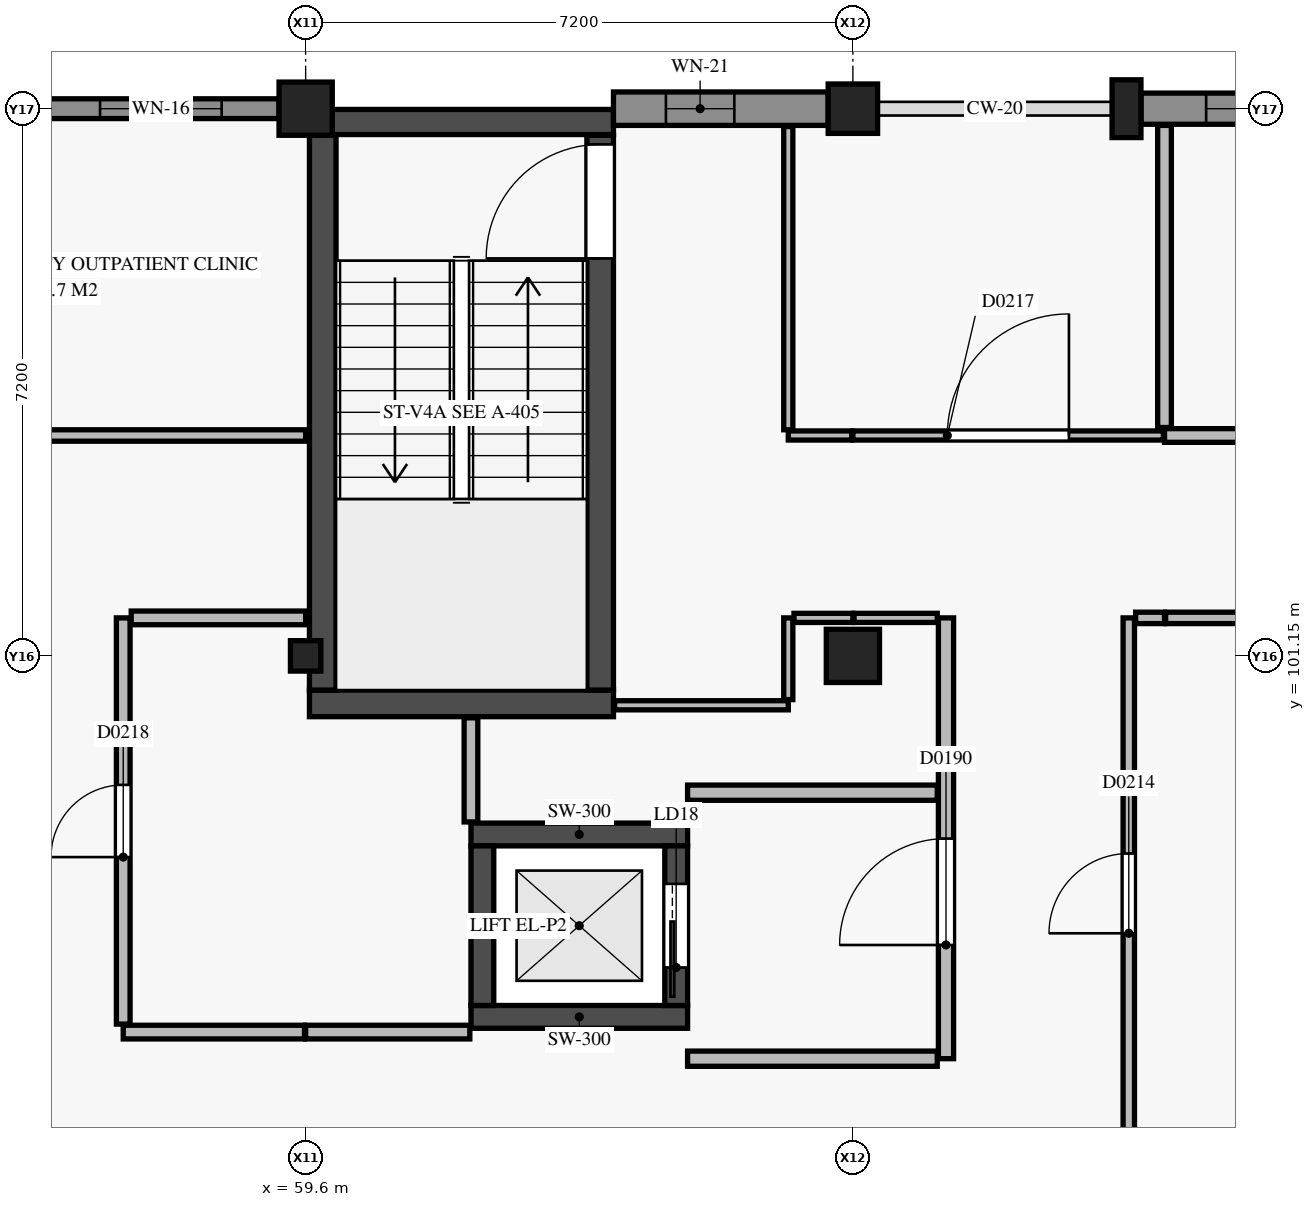
"""IFC4 building model, lengths in metres.
Left out: names, types, materials, properties, quantities, classifications, styles, units other than length and angle.
Written with IfcOpenShell. Run it as: python <this file> out.ifc"""

import sys

from ifc_helpers import new_model, si_unit, direction, frame, frame_2d, origin, origin_2d, place, context, subcontext, project, spatial, rectangle, circle, extrude, element, fill, save


model = new_model("IFC4")
c1 = context("Model", 3, precision=1e-05, world=origin(), true_north=direction((0.0, 1.0)))
c2 = subcontext(c1, "Body", "Model", "MODEL_VIEW")
j1 = project(units=[si_unit("LENGTHUNIT", "METRE"), si_unit("PLANEANGLEUNIT", "RADIAN")], contexts=[c1])
p1 = place(None, origin())
s1 = spatial("IfcSite", under=j1, at=p1, CompositionType="ELEMENT")
p2 = place(p1, origin())
s2 = spatial("IfcBuilding", under=s1, at=p2, CompositionType="ELEMENT")
p3 = place(p2, frame((0.0, 0.0, 4.8)))
s3 = spatial("IfcBuildingStorey", under=s2, at=p3, CompositionType="ELEMENT", Elevation=4.8)
p4 = place(p3, frame((59.6, 101.15, 0.0), z_axis=(0.0, 0.0, 1.0), x_axis=(1.0, 0.0, 0.0)))
e1 = element("IfcColumn", 1, at=p4, inside=s3, PredefinedType="COLUMN", context=c2, shape_type="SweptSolid", body=[
    extrude(rectangle(XDim=0.4, YDim=0.4, at=origin_2d()), origin(), (0.0, 0.0, 1.0), 4.2),
])
p5 = place(p3, frame((59.6, 108.35, 0.0), z_axis=(0.0, 0.0, 1.0), x_axis=(1.0, 0.0, 0.0)))
e2 = element("IfcColumn", 2, at=p5, inside=s3, PredefinedType="COLUMN", context=c2, shape_type="SweptSolid", body=[
    extrude(circle(Radius=0.35, at=origin_2d()), origin(), (0.0, 0.0, 1.0), 4.2),
])
p6 = place(p3, frame((66.8, 101.15, 0.0), z_axis=(0.0, 0.0, 1.0), x_axis=(1.0, 0.0, 0.0)))
e3 = element("IfcColumn", 3, at=p6, inside=s3, PredefinedType="COLUMN", context=c2, shape_type="SweptSolid", body=[
    extrude(rectangle(XDim=0.7, YDim=0.7, at=origin_2d()), origin(), (0.0, 0.0, 1.0), 4.2),
])
p7 = place(p3, frame((66.8, 108.35, 0.0), z_axis=(0.0, 0.0, 1.0), x_axis=(1.0, 0.0, 0.0)))
e4 = element("IfcColumn", 4, at=p7, inside=s3, PredefinedType="COLUMN", context=c2, shape_type="SweptSolid", body=[
    extrude(rectangle(XDim=0.65, YDim=0.65, at=origin_2d()), origin(), (0.0, 0.0, 1.0), 4.2),
])
p8 = place(p3, frame((70.4, 108.35, 0.0), z_axis=(0.0, 0.0, 1.0), x_axis=(1.0, 0.0, 0.0)))
e5 = element("IfcColumn", 5, at=p8, inside=s3, PredefinedType="PILASTER", context=c2, shape_type="SweptSolid", body=[
    extrude(rectangle(XDim=0.38, YDim=0.76, at=origin_2d()), origin(), (0.0, 0.0, 1.0), 4.2),
])
p9 = place(p3, frame((59.65, 100.525, 0.0), z_axis=(0.0, 0.0, 1.0), x_axis=(1.0, 0.0, 0.0)))
e6 = element("IfcWall", 6, at=p9, inside=s3, PredefinedType="SHEAR", context=c2, shape_type="SweptSolid", body=[
    extrude(rectangle(XDim=4.0, YDim=0.35, at=frame_2d((2.0, 0.0))), origin(), (0.0, 0.0, 1.0), 3.95),
])
p10 = place(p3, frame((59.65, 108.175, 0.0), z_axis=(0.0, 0.0, 1.0), x_axis=(1.0, 0.0, 0.0)))
e7 = element("IfcWall", 7, at=p10, inside=s3, PredefinedType="SHEAR", context=c2, shape_type="SweptSolid", body=[
    extrude(rectangle(XDim=4.0, YDim=0.33, at=frame_2d((2.0, 0.0))), origin(), (0.0, 0.0, 1.0), 3.95),
])
p11 = place(p3, frame((59.825, 100.7, 0.0), z_axis=(0.0, 0.0, 1.0), x_axis=(0.0, 1.0, 0.0)))
e8 = element("IfcWall", 8, at=p11, inside=s3, PredefinedType="SHEAR", context=c2, shape_type="SweptSolid", body=[
    extrude(rectangle(XDim=7.3, YDim=0.35, at=frame_2d((3.65, 0.0))), origin(), (0.0, 0.0, 1.0), 3.95),
])
p12 = place(p3, frame((63.475, 100.7, 0.0), z_axis=(0.0, 0.0, 1.0), x_axis=(0.0, 1.0, 0.0)))
e9 = element("IfcWall", 9, at=p12, inside=s3, PredefinedType="SHEAR", context=c2, shape_type="SweptSolid", body=[
    extrude(rectangle(XDim=7.3, YDim=0.35, at=frame_2d((3.65, 0.0))), origin(), (0.0, 0.0, 1.0), 3.95),
])
p13 = place(p12, frame((5.68, 0.0, 0.0)))
e10 = element("IfcOpeningElement", 10, at=p13, cuts=e9, PredefinedType="OPENING", context=c2, shape_type="SweptSolid", body=[
    extrude(rectangle(XDim=1.5, YDim=2.15, at=frame_2d((0.75, 1.075))), frame((0.0, 0.185, 0.0), z_axis=(0.0, -1.0, 0.0), x_axis=(1.0, 0.0, 0.0)), (0.0, 0.0, 1.0), 0.37),
])
for number, where, z_axis, x_axis in (
    (11, (61.775, 96.4, 0.0), (0.0, 0.0, 1.0), (1.0, 0.0, 0.0)),
    (12, (61.775, 98.8, 0.0), (0.0, 0.0, 1.0), (1.0, 0.0, 0.0)),
):
    element("IfcWall", number, at=place(p3, frame(where, z_axis=z_axis, x_axis=x_axis)), inside=s3, PredefinedType="SHEAR", context=c2, shape_type="SweptSolid", body=[
        extrude(rectangle(XDim=2.85, YDim=0.3, at=frame_2d((1.425, 0.0))), origin(), (0.0, 0.0, 1.0), 3.95),
    ])
p14 = place(p3, frame((61.925, 96.55, 0.0), z_axis=(0.0, 0.0, 1.0), x_axis=(0.0, 1.0, 0.0)))
e13 = element("IfcWall", 13, at=p14, inside=s3, PredefinedType="SHEAR", context=c2, shape_type="SweptSolid", body=[
    extrude(rectangle(XDim=2.1, YDim=0.3, at=frame_2d((1.05, 0.0))), origin(), (0.0, 0.0, 1.0), 3.95),
])
p15 = place(p3, frame((64.475, 96.55, 0.0), z_axis=(0.0, 0.0, 1.0), x_axis=(0.0, 1.0, 0.0)))
e14 = element("IfcWall", 14, at=p15, inside=s3, PredefinedType="SHEAR", context=c2, shape_type="SweptSolid", body=[
    extrude(rectangle(XDim=2.1, YDim=0.3, at=frame_2d((1.05, 0.0))), origin(), (0.0, 0.0, 1.0), 3.95),
])
p16 = place(p15, frame((0.5, 0.0, 0.0)))
e15 = element("IfcOpeningElement", 15, at=p16, cuts=e14, PredefinedType="OPENING", context=c2, shape_type="SweptSolid", body=[
    extrude(rectangle(XDim=1.1, YDim=2.15, at=frame_2d((0.55, 1.075))), frame((0.0, 0.16, 0.0), z_axis=(0.0, -1.0, 0.0), x_axis=(1.0, 0.0, 0.0)), (0.0, 0.0, 1.0), 0.32),
])
p17 = place(p3, frame((56.14, 108.35, 0.0), z_axis=(0.0, 0.0, 1.0), x_axis=(1.0, 0.0, 0.0)))
e16 = element("IfcWall", 16, at=p17, inside=s3, PredefinedType="SOLIDWALL", context=c2, shape_type="SweptSolid", body=[
    extrude(rectangle(XDim=3.11, YDim=0.26, at=frame_2d((1.555, 0.0))), origin(), (0.0, 0.0, 1.0), 3.13),
])
p18 = place(p17, frame((0.755, 0.0, 0.6)))
e17 = element("IfcOpeningElement", 17, at=p18, cuts=e16, PredefinedType="OPENING", context=c2, shape_type="SweptSolid", body=[
    extrude(rectangle(XDim=1.6, YDim=2.2, at=frame_2d((0.8, 1.1))), frame((0.0, 0.14, 0.0), z_axis=(0.0, -1.0, 0.0), x_axis=(1.0, 0.0, 0.0)), (0.0, 0.0, 1.0), 0.28),
])
p19 = place(p3, frame((63.65, 108.35, 0.0), z_axis=(0.0, 0.0, 1.0), x_axis=(1.0, 0.0, 0.0)))
e18 = element("IfcWall", 18, at=p19, inside=s3, PredefinedType="USERDEFINED", context=c2, shape_type="SweptSolid", body=[
    extrude(rectangle(XDim=2.825, YDim=0.44, at=frame_2d((1.413, 0.0))), origin(), (0.0, 0.0, 1.0), 3.13),
])
p20 = place(p19, frame((0.69, 0.0, 0.9)))
e19 = element("IfcOpeningElement", 19, at=p20, cuts=e18, PredefinedType="OPENING", context=c2, shape_type="SweptSolid", body=[
    extrude(rectangle(XDim=0.9, YDim=1.2, at=frame_2d((0.45, 0.6))), frame((0.0, 0.23, 0.0), z_axis=(0.0, -1.0, 0.0), x_axis=(1.0, 0.0, 0.0)), (0.0, 0.0, 1.0), 0.46),
])
p21 = place(p3, frame((70.59, 108.35, 0.0), z_axis=(0.0, 0.0, 1.0), x_axis=(1.0, 0.0, 0.0)))
e20 = element("IfcWall", 20, at=p21, inside=s3, PredefinedType="USERDEFINED", context=c2, shape_type="SweptSolid", body=[
    extrude(rectangle(XDim=3.185, YDim=0.41, at=frame_2d((1.592, 0.0))), origin(), (0.0, 0.0, 1.0), 3.13),
])
p22 = place(p21, frame((0.857, 0.0, 0.9)))
e21 = element("IfcOpeningElement", 21, at=p22, cuts=e20, PredefinedType="OPENING", context=c2, shape_type="SweptSolid", body=[
    extrude(rectangle(XDim=1.8, YDim=0.9, at=frame_2d((0.9, 0.45))), frame((0.0, 0.215, 0.0), z_axis=(0.0, -1.0, 0.0), x_axis=(1.0, 0.0, 0.0)), (0.0, 0.0, 1.0), 0.43),
])
p23 = place(p3, frame((68.025, 95.85, 0.0), z_axis=(0.0, 0.0, 1.0), x_axis=(0.0, 1.0, 0.0)))
e22 = element("IfcWall", 22, at=p23, inside=s3, PredefinedType="PARTITIONING", context=c2, shape_type="SweptSolid", body=[
    extrude(rectangle(XDim=5.8, YDim=0.2, at=frame_2d((2.9, 0.0))), origin(), (0.0, 0.0, 1.0), 3.455),
])
p24 = place(p23, frame((1.496, 0.0, 0.0)))
e23 = element("IfcOpeningElement", 23, at=p24, cuts=e22, PredefinedType="OPENING", context=c2, shape_type="SweptSolid", body=[
    extrude(rectangle(XDim=1.4, YDim=2.2, at=frame_2d((0.7, 1.1))), frame((0.0, 0.11, 0.0), z_axis=(0.0, -1.0, 0.0), x_axis=(1.0, 0.0, 0.0)), (0.0, 0.0, 1.0), 0.22),
])
for number, where, z_axis, x_axis in (
    (24, (64.625, 95.85, 0.0), (0.0, 0.0, 1.0), (1.0, 0.0, 0.0)),
    (25, (64.625, 99.35, 0.0), (0.0, 0.0, 1.0), (1.0, 0.0, 0.0)),
):
    element("IfcWall", number, at=place(p3, frame(where, z_axis=z_axis, x_axis=x_axis)), inside=s3, PredefinedType="PARTITIONING", context=c2, shape_type="SweptSolid", body=[
        extrude(rectangle(XDim=3.285, YDim=0.2, at=frame_2d((1.643, 0.0))), origin(), (0.0, 0.0, 1.0), 3.455),
    ])
p25 = place(p3, frame((59.6, 96.2, 0.0), z_axis=(0.0, 0.0, 1.0), x_axis=(1.0, 0.0, 0.0)))
e26 = element("IfcWall", 26, at=p25, inside=s3, PredefinedType="PLUMBINGWALL", context=c2, shape_type="SweptSolid", body=[
    extrude(rectangle(XDim=2.16, YDim=0.18, at=frame_2d((1.08, 0.0))), origin(), (0.0, 0.0, 1.0), 3.285),
])
p26 = place(p3, frame((57.2, 96.2, 0.0), z_axis=(0.0, 0.0, 1.0), x_axis=(1.0, 0.0, 0.0)))
e27 = element("IfcWall", 27, at=p26, inside=s3, PredefinedType="PLUMBINGWALL", context=c2, shape_type="SweptSolid", body=[
    extrude(rectangle(XDim=2.385, YDim=0.18, at=frame_2d((1.192, 0.0))), origin(), (0.0, 0.0, 1.0), 3.285),
])
p27 = place(p3, frame((57.2, 96.305, 0.0), z_axis=(0.0, 0.0, 1.0), x_axis=(0.0, 1.0, 0.0)))
e28 = element("IfcWall", 28, at=p27, inside=s3, PredefinedType="PLUMBINGWALL", context=c2, shape_type="SweptSolid", body=[
    extrude(rectangle(XDim=5.345, YDim=0.18, at=frame_2d((2.672, 0.0))), origin(), (0.0, 0.0, 1.0), 3.355),
])
p28 = place(p27, frame((2.198, 0.0, 0.0)))
e29 = element("IfcOpeningElement", 29, at=p28, cuts=e28, PredefinedType="OPENING", context=c2, shape_type="SweptSolid", body=[
    extrude(rectangle(XDim=0.95, YDim=2.1, at=frame_2d((0.475, 1.05))), frame((0.0, 0.1, 0.0), z_axis=(0.0, -1.0, 0.0), x_axis=(1.0, 0.0, 0.0)), (0.0, 0.0, 1.0), 0.2),
])
p29 = place(p3, frame((57.305, 101.65, 0.0), z_axis=(0.0, 0.0, 1.0), x_axis=(1.0, 0.0, 0.0)))
e30 = element("IfcWall", 30, at=p29, inside=s3, PredefinedType="PLUMBINGWALL", context=c2, shape_type="SweptSolid", body=[
    extrude(rectangle(XDim=2.295, YDim=0.18, at=frame_2d((1.147, 0.0))), origin(), (0.0, 0.0, 1.0), 3.415),
])
p30 = place(p3, frame((70.9, 104.05, 0.0), z_axis=(0.0, 0.0, 1.0), x_axis=(1.0, 0.0, 0.0)))
e31 = element("IfcWall", 31, at=p30, inside=s3, PredefinedType="PLUMBINGWALL", context=c2, shape_type="SweptSolid", body=[
    extrude(rectangle(XDim=3.1, YDim=0.18, at=frame_2d((1.55, 0.0))), origin(), (0.0, 0.0, 1.0), 3.355),
])
p31 = place(p30, frame((1.075, 0.0, 0.0)))
e32 = element("IfcOpeningElement", 32, at=p31, cuts=e31, PredefinedType="OPENING", context=c2, shape_type="SweptSolid", body=[
    extrude(rectangle(XDim=0.95, YDim=2.1, at=frame_2d((0.475, 1.05))), frame((0.0, 0.1, 0.0), z_axis=(0.0, -1.0, 0.0), x_axis=(1.0, 0.0, 0.0)), (0.0, 0.0, 1.0), 0.2),
])
p32 = place(p3, frame((54.89, 104.05, 0.0), z_axis=(0.0, 0.0, 1.0), x_axis=(1.0, 0.0, 0.0)))
e33 = element("IfcWall", 33, at=p32, inside=s3, PredefinedType="PARTITIONING", context=c2, shape_type="SweptSolid", body=[
    extrude(rectangle(XDim=4.71, YDim=0.15, at=frame_2d((2.355, 0.0))), origin(), (0.0, 0.0, 1.0), 3.415),
])
p33 = place(p3, frame((70.43, 94.4, 0.0), z_axis=(0.0, 0.0, 1.0), x_axis=(0.0, 1.0, 0.0)))
e34 = element("IfcWall", 34, at=p33, inside=s3, PredefinedType="PARTITIONING", context=c2, shape_type="SweptSolid", body=[
    extrude(rectangle(XDim=7.25, YDim=0.15, at=frame_2d((3.625, 0.0))), origin(), (0.0, 0.0, 1.0), 3.455),
])
p34 = place(p33, frame((3.1, 0.0, 0.0)))
e35 = element("IfcOpeningElement", 35, at=p34, cuts=e34, PredefinedType="OPENING", context=c2, shape_type="SweptSolid", body=[
    extrude(rectangle(XDim=1.05, YDim=2.15, at=frame_2d((0.525, 1.075))), frame((0.0, 0.085, 0.0), z_axis=(0.0, -1.0, 0.0), x_axis=(1.0, 0.0, 0.0)), (0.0, 0.0, 1.0), 0.17),
])
p35 = place(p3, frame((70.52, 101.65, 0.0), z_axis=(0.0, 0.0, 1.0), x_axis=(1.0, 0.0, 0.0)))
e36 = element("IfcWall", 36, at=p35, inside=s3, PredefinedType="PARTITIONING", context=c2, shape_type="SweptSolid", body=[
    extrude(rectangle(XDim=0.38, YDim=0.15, at=frame_2d((0.19, 0.0))), origin(), (0.0, 0.0, 1.0), 3.95),
])
p36 = place(p3, frame((70.915, 101.65, 0.0), z_axis=(0.0, 0.0, 1.0), x_axis=(1.0, 0.0, 0.0)))
e37 = element("IfcWall", 37, at=p36, inside=s3, PredefinedType="PARTITIONING", context=c2, shape_type="SweptSolid", body=[
    extrude(rectangle(XDim=3.085, YDim=0.15, at=frame_2d((1.542, 0.0))), origin(), (0.0, 0.0, 1.0), 3.355),
])
p37 = place(p3, frame((66.8, 104.05, 0.0), z_axis=(0.0, 0.0, 1.0), x_axis=(1.0, 0.0, 0.0)))
e38 = element("IfcWall", 38, at=p37, inside=s3, PredefinedType="PARTITIONING", context=c2, shape_type="SweptSolid", body=[
    extrude(rectangle(XDim=4.085, YDim=0.12, at=frame_2d((2.042, 0.0))), origin(), (0.0, 0.0, 1.0), 3.215),
])
p38 = place(p37, frame((1.242, 0.0, 0.0)))
e39 = element("IfcOpeningElement", 39, at=p38, cuts=e38, PredefinedType="OPENING", context=c2, shape_type="SweptSolid", body=[
    extrude(rectangle(XDim=1.6, YDim=2.25, at=frame_2d((0.8, 1.125))), frame((0.0, 0.07, 0.0), z_axis=(0.0, -1.0, 0.0), x_axis=(1.0, 0.0, 0.0)), (0.0, 0.0, 1.0), 0.14),
])
p39 = place(p3, frame((65.95, 104.05, 0.0), z_axis=(0.0, 0.0, 1.0), x_axis=(1.0, 0.0, 0.0)))
e40 = element("IfcWall", 40, at=p39, inside=s3, PredefinedType="PARTITIONING", context=c2, shape_type="SweptSolid", body=[
    extrude(rectangle(XDim=0.835, YDim=0.12, at=frame_2d((0.417, 0.0))), origin(), (0.0, 0.0, 1.0), 3.215),
])
p40 = place(p3, frame((65.95, 104.125, 0.0), z_axis=(0.0, 0.0, 1.0), x_axis=(0.0, 1.0, 0.0)))
e41 = element("IfcWall", 41, at=p40, inside=s3, PredefinedType="PARTITIONING", context=c2, shape_type="SweptSolid", body=[
    extrude(rectangle(XDim=3.99, YDim=0.12, at=frame_2d((1.995, 0.0))), origin(), (0.0, 0.0, 1.0), 3.95),
])
p41 = place(p3, frame((63.665, 100.5, 0.0), z_axis=(0.0, 0.0, 1.0), x_axis=(1.0, 0.0, 0.0)))
e42 = element("IfcWall", 42, at=p41, inside=s3, PredefinedType="PARTITIONING", context=c2, shape_type="SweptSolid", body=[
    extrude(rectangle(XDim=2.285, YDim=0.12, at=frame_2d((1.143, 0.0))), origin(), (0.0, 0.0, 1.0), 3.95),
])
p42 = place(p3, frame((65.95, 100.575, 0.0), z_axis=(0.0, 0.0, 1.0), x_axis=(0.0, 1.0, 0.0)))
e43 = element("IfcWall", 43, at=p42, inside=s3, PredefinedType="PARTITIONING", context=c2, shape_type="SweptSolid", body=[
    extrude(rectangle(XDim=1.075, YDim=0.12, at=frame_2d((0.538, 0.0))), origin(), (0.0, 0.0, 1.0), 3.95),
])
p43 = place(p3, frame((66.025, 101.65, 0.0), z_axis=(0.0, 0.0, 1.0), x_axis=(1.0, 0.0, 0.0)))
e44 = element("IfcWall", 44, at=p43, inside=s3, PredefinedType="PARTITIONING", context=c2, shape_type="SweptSolid", body=[
    extrude(rectangle(XDim=0.775, YDim=0.12, at=frame_2d((0.388, 0.0))), origin(), (0.0, 0.0, 1.0), 3.215),
])
p44 = place(p3, frame((66.815, 101.65, 0.0), z_axis=(0.0, 0.0, 1.0), x_axis=(1.0, 0.0, 0.0)))
e45 = element("IfcWall", 45, at=p44, inside=s3, PredefinedType="PARTITIONING", context=c2, shape_type="SweptSolid", body=[
    extrude(rectangle(XDim=1.095, YDim=0.12, at=frame_2d((0.547, 0.0))), origin(), (0.0, 0.0, 1.0), 3.215),
])
p45 = place(p3, frame((61.775, 98.965, 0.0), z_axis=(0.0, 0.0, 1.0), x_axis=(0.0, 1.0, 0.0)))
e46 = element("IfcWall", 46, at=p45, inside=s3, PredefinedType="PLUMBINGWALL", context=c2, shape_type="SweptSolid", body=[
    extrude(rectangle(XDim=1.37, YDim=0.18, at=frame_2d((0.685, 0.0))), origin(), (0.0, 0.0, 1.0), 3.95),
])
p46 = place(p3, frame((70.9, 104.155, 0.0), z_axis=(0.0, 0.0, 1.0), x_axis=(0.0, 1.0, 0.0)))
e47 = element("IfcWall", 47, at=p46, inside=s3, PredefinedType="PLUMBINGWALL", context=c2, shape_type="SweptSolid", body=[
    extrude(rectangle(XDim=3.975, YDim=0.18, at=frame_2d((1.987, 0.0))), origin(), (0.0, 0.0, 1.0), 3.515),
])
p47 = place(p18, origin())
e48 = element("IfcWindow", 48, at=p47, inside=s3, PartitioningType="SINGLE_PANEL", PredefinedType="WINDOW", context=c2, shape_type="SweptSolid", body=[
    extrude(rectangle(XDim=1.6, YDim=2.2, at=frame_2d((0.8, 1.1))), frame((0.0, 0.03, 0.0), z_axis=(0.0, -1.0, 0.0), x_axis=(1.0, 0.0, 0.0)), (0.0, 0.0, 1.0), 0.06),
])
fill(e17, e48)
p48 = place(p20, origin())
e49 = element("IfcWindow", 49, at=p48, inside=s3, PartitioningType="SINGLE_PANEL", PredefinedType="WINDOW", context=c2, shape_type="SweptSolid", body=[
    extrude(rectangle(XDim=0.9, YDim=1.2, at=frame_2d((0.45, 0.6))), frame((0.0, 0.03, 0.0), z_axis=(0.0, -1.0, 0.0), x_axis=(1.0, 0.0, 0.0)), (0.0, 0.0, 1.0), 0.06),
])
fill(e19, e49)
p49 = place(p22, origin())
e50 = element("IfcWindow", 50, at=p49, inside=s3, PartitioningType="SINGLE_PANEL", PredefinedType="WINDOW", context=c2, shape_type="SweptSolid", body=[
    extrude(rectangle(XDim=1.8, YDim=0.9, at=frame_2d((0.9, 0.45))), frame((0.0, 0.03, 0.0), z_axis=(0.0, -1.0, 0.0), x_axis=(1.0, 0.0, 0.0)), (0.0, 0.0, 1.0), 0.06),
])
fill(e21, e50)
p50 = place(p13, origin())
e51 = element("IfcDoor", 51, at=p50, inside=s3, OperationType="SINGLE_SWING_LEFT", PredefinedType="DOOR", context=c2, shape_type="SweptSolid", body=[
    extrude(rectangle(XDim=1.5, YDim=2.15, at=frame_2d((0.75, 1.075))), frame((0.0, 0.025, 0.0), z_axis=(0.0, -1.0, 0.0), x_axis=(1.0, 0.0, 0.0)), (0.0, 0.0, 1.0), 0.05),
])
fill(e10, e51)
p51 = place(p16, origin())
e52 = element("IfcDoor", 52, at=p51, inside=s3, OperationType="SLIDING_TO_LEFT", PredefinedType="DOOR", context=c2, shape_type="SweptSolid", body=[
    extrude(rectangle(XDim=1.1, YDim=2.15, at=frame_2d((0.55, 1.075))), frame((0.0, 0.025, 0.0), z_axis=(0.0, -1.0, 0.0), x_axis=(1.0, 0.0, 0.0)), (0.0, 0.0, 1.0), 0.05),
])
fill(e15, e52)
p52 = place(p24, origin())
e53 = element("IfcDoor", 53, at=p52, inside=s3, OperationType="SINGLE_SWING_LEFT", PredefinedType="DOOR", context=c2, shape_type="SweptSolid", body=[
    extrude(rectangle(XDim=1.4, YDim=2.2, at=frame_2d((0.7, 1.1))), frame((0.0, 0.025, 0.0), z_axis=(0.0, -1.0, 0.0), x_axis=(1.0, 0.0, 0.0)), (0.0, 0.0, 1.0), 0.05),
])
fill(e23, e53)
p53 = place(p34, origin())
e54 = element("IfcDoor", 54, at=p53, inside=s3, OperationType="SINGLE_SWING_LEFT", PredefinedType="DOOR", context=c2, shape_type="SweptSolid", body=[
    extrude(rectangle(XDim=1.05, YDim=2.15, at=frame_2d((0.525, 1.075))), frame((0.0, 0.025, 0.0), z_axis=(0.0, -1.0, 0.0), x_axis=(1.0, 0.0, 0.0)), (0.0, 0.0, 1.0), 0.05),
])
fill(e35, e54)
p54 = place(p38, origin())
e55 = element("IfcDoor", 55, at=p54, inside=s3, OperationType="SINGLE_SWING_RIGHT", PredefinedType="DOOR", context=c2, shape_type="SweptSolid", body=[
    extrude(rectangle(XDim=1.6, YDim=2.25, at=frame_2d((0.8, 1.125))), frame((0.0, 0.025, 0.0), z_axis=(0.0, -1.0, 0.0), x_axis=(1.0, 0.0, 0.0)), (0.0, 0.0, 1.0), 0.05),
])
fill(e39, e55)
p55 = place(p28, origin())
e56 = element("IfcDoor", 56, at=p55, inside=s3, OperationType="SINGLE_SWING_LEFT", PredefinedType="DOOR", context=c2, shape_type="SweptSolid", body=[
    extrude(rectangle(XDim=0.95, YDim=2.1, at=frame_2d((0.475, 1.05))), frame((0.0, 0.025, 0.0), z_axis=(0.0, -1.0, 0.0), x_axis=(1.0, 0.0, 0.0)), (0.0, 0.0, 1.0), 0.05),
])
fill(e29, e56)
save(model, sys.argv[1])
